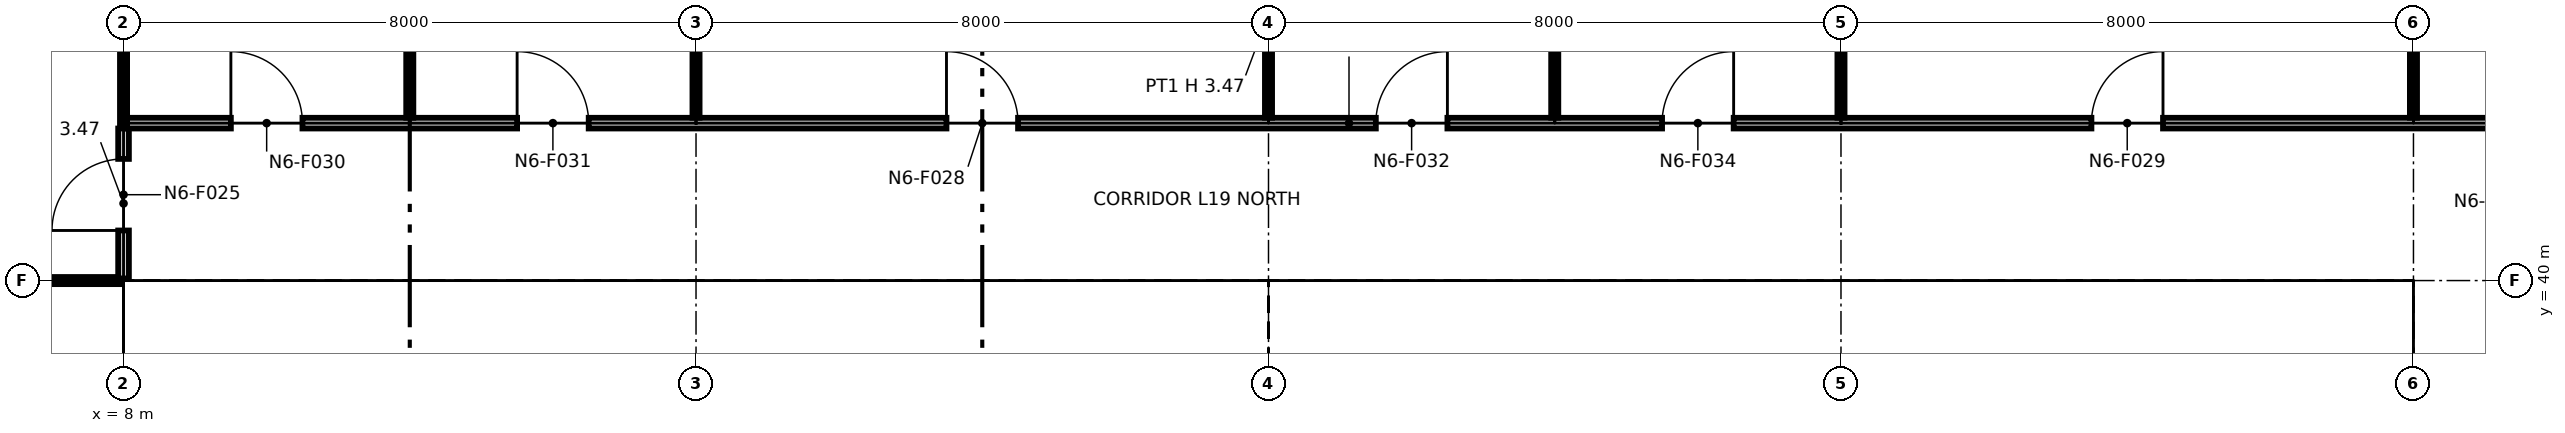
"""IFC4 building model, lengths in metres.
Left out: names, types, materials, properties, quantities, classifications, styles, units other than length and angle.
Written with IfcOpenShell. Run it as: python <this file> out.ifc"""

import sys

from ifc_helpers import new_model, si_unit, direction, frame, frame_2d, origin, origin_2d, place, context, subcontext, project, spatial, polyline, rectangle, i_section, outline, extrude, element, fill, save


model = new_model("IFC4")
c1 = context("Model", 3, precision=1e-05, world=origin(), true_north=direction((0.0, 1.0)))
c2 = subcontext(c1, "Body", "Model", "MODEL_VIEW")
j1 = project(units=[si_unit("LENGTHUNIT", "METRE"), si_unit("PLANEANGLEUNIT", "RADIAN")], contexts=[c1])
p1 = place(None, origin())
s1 = spatial("IfcSite", under=j1, at=p1, CompositionType="ELEMENT")
p2 = place(p1, origin())
s2 = spatial("IfcBuilding", under=s1, at=p2, CompositionType="ELEMENT")
p3 = place(p2, frame((0.0, 0.0, 100.8)))
s3 = spatial("IfcBuildingStorey", under=s2, at=p3, CompositionType="ELEMENT", Elevation=100.8)
for number, where, z_axis, x_axis in (
    (1, (8.0, 40.0, 0.0), (0.0, 0.0, 1.0), (1.0, 0.0, 0.0)),
    (2, (16.0, 40.0, 0.0), (0.0, 0.0, 1.0), (1.0, 0.0, 0.0)),
):
    element("IfcColumn", number, at=place(p3, frame(where, z_axis=z_axis, x_axis=x_axis)), inside=s3, PredefinedType="COLUMN", context=c2, shape_type="SweptSolid", body=[
        extrude(i_section(OverallWidth=0.373, OverallDepth=0.368, WebThickness=0.015, FlangeThickness=0.024, at=origin_2d()), origin(), (0.0, 0.0, 1.0), 4.25),
    ])
p4 = place(p3, frame((24.0, 40.0, 0.0), z_axis=(0.0, 0.0, 1.0), x_axis=(1.0, 0.0, 0.0)))
e3 = element("IfcColumn", 3, at=p4, inside=s3, PredefinedType="COLUMN", context=c2, shape_type="SweptSolid", body=[
    extrude(i_section(OverallWidth=0.394, OverallDepth=0.376, WebThickness=0.017, FlangeThickness=0.028, at=origin_2d()), origin(), (0.0, 0.0, 1.0), 4.25),
])
for number, where, z_axis, x_axis in (
    (4, (32.0, 40.0, 0.0), (0.0, 0.0, 1.0), (1.0, 0.0, 0.0)),
    (5, (40.0, 40.0, 0.0), (0.0, 0.0, 1.0), (1.0, 0.0, 0.0)),
):
    element("IfcColumn", number, at=place(p3, frame(where, z_axis=z_axis, x_axis=x_axis)), inside=s3, PredefinedType="COLUMN", context=c2, shape_type="SweptSolid", body=[
        extrude(i_section(OverallWidth=0.257, OverallDepth=0.363, WebThickness=0.013, FlangeThickness=0.022, at=origin_2d()), origin(), (0.0, 0.0, 1.0), 4.25),
    ])
p5 = place(p3, frame((8.75, 32.85, 0.0), z_axis=(0.0, 0.0, 1.0), x_axis=(0.0, 1.0, 0.0)))
e6 = element("IfcWall", 6, at=p5, inside=s3, PredefinedType="PARTITIONING", context=c2, shape_type="SweptSolid", body=[
    extrude(outline(polyline([(0.0, 0.0), (6.3, 0.0), (6.3, 4.25), (3.231, 4.25), (3.23, 3.789), (3.07, 3.789), (3.069, 4.25), (0.0, 4.25), (0.0, 0.0)])), frame((0.0, 0.1, 0.0), z_axis=(0.0, -1.0, 0.0), x_axis=(1.0, 0.0, 0.0)), (0.0, 0.0, 1.0), 0.2),
])
p6 = place(p3, frame((8.65, 39.25, 0.0), z_axis=(0.0, 0.0, 1.0), x_axis=(1.0, 0.0, 0.0)))
e7 = element("IfcWall", 7, at=p6, inside=s3, PredefinedType="PARTITIONING", context=c2, shape_type="SweptSolid", body=[
    extrude(outline(polyline([(0.0, 0.0), (14.7, 0.0), (14.7, 4.25), (7.469, 4.25), (7.469, 3.632), (7.231, 3.632), (7.23, 4.25), (0.0, 4.25), (0.0, 0.0)])), frame((0.0, 0.1, 0.0), z_axis=(0.0, -1.0, 0.0), x_axis=(1.0, 0.0, 0.0)), (0.0, 0.0, 1.0), 0.2),
])
for number, where, z_axis, x_axis in (
    (8, (10.675, 34.95, 0.0), (0.0, 0.0, 1.0), (0.0, 1.0, 0.0)),
    (9, (12.425, 34.95, 0.0), (0.0, 0.0, 1.0), (0.0, 1.0, 0.0)),
    (10, (14.275, 34.95, 0.0), (0.0, 0.0, 1.0), (0.0, 1.0, 0.0)),
):
    element("IfcWall", number, at=place(p3, frame(where, z_axis=z_axis, x_axis=x_axis)), inside=s3, PredefinedType="PARTITIONING", context=c2, shape_type="SweptSolid", body=[
        extrude(outline(polyline([(0.0, 0.0), (4.2, 0.0), (4.2, 4.25), (1.132, 4.25), (1.131, 3.789), (0.969, 3.789), (0.969, 4.25), (0.0, 4.25), (0.0, 0.0)])), frame((0.0, 0.075, 0.0), z_axis=(0.0, -1.0, 0.0), x_axis=(1.0, 0.0, 0.0)), (0.0, 0.0, 1.0), 0.15),
    ])
p7 = place(p3, frame((16.0, 34.95, 0.0), z_axis=(0.0, 0.0, 1.0), x_axis=(0.0, 1.0, 0.0)))
e11 = element("IfcWall", 11, at=p7, inside=s3, PredefinedType="PARTITIONING", context=c2, shape_type="SweptSolid", body=[
    extrude(rectangle(XDim=4.2, YDim=0.6, at=frame_2d((2.1, 0.0))), origin(), (0.0, 0.0, 1.0), 3.632),
])
for number, where, z_axis, x_axis in (
    (12, (19.2, 32.85, 0.0), (0.0, 0.0, 1.0), (0.0, 1.0, 0.0)),
    (13, (23.25, 32.85, 0.0), (0.0, 0.0, 1.0), (0.0, 1.0, 0.0)),
):
    element("IfcWall", number, at=place(p3, frame(where, z_axis=z_axis, x_axis=x_axis)), inside=s3, PredefinedType="PARTITIONING", context=c2, shape_type="SweptSolid", body=[
        extrude(rectangle(XDim=6.3, YDim=0.2, at=frame_2d((3.15, 0.0))), origin(), (0.0, 0.0, 1.0), 4.25),
    ])
p8 = place(p3, frame((24.75, 32.85, 0.0), z_axis=(0.0, 0.0, 1.0), x_axis=(0.0, 1.0, 0.0)))
e14 = element("IfcWall", 14, at=p8, inside=s3, PredefinedType="PARTITIONING", context=c2, shape_type="SweptSolid", body=[
    extrude(outline(polyline([(0.0, 0.0), (6.3, 0.0), (6.3, 4.25), (3.231, 4.25), (3.23, 3.789), (3.07, 3.789), (3.069, 4.25), (0.0, 4.25), (0.0, 0.0)])), frame((0.0, 0.1, 0.0), z_axis=(0.0, -1.0, 0.0), x_axis=(1.0, 0.0, 0.0)), (0.0, 0.0, 1.0), 0.2),
])
p9 = place(p3, frame((24.65, 39.25, 0.0), z_axis=(0.0, 0.0, 1.0), x_axis=(1.0, 0.0, 0.0)))
e15 = element("IfcWall", 15, at=p9, inside=s3, PredefinedType="PARTITIONING", context=c2, shape_type="SweptSolid", body=[
    extrude(outline(polyline([(0.0, 0.0), (14.7, 0.0), (14.7, 4.25), (7.469, 4.25), (7.469, 3.632), (7.231, 3.632), (7.23, 4.25), (0.0, 4.25), (0.0, 0.0)])), frame((0.0, 0.1, 0.0), z_axis=(0.0, -1.0, 0.0), x_axis=(1.0, 0.0, 0.0)), (0.0, 0.0, 1.0), 0.2),
])
for number, where, z_axis, x_axis in (
    (16, (27.2, 36.4, 0.0), (0.0, 0.0, 1.0), (0.0, 1.0, 0.0)),
    (17, (29.5, 36.4, 0.0), (0.0, 0.0, 1.0), (0.0, 1.0, 0.0)),
):
    element("IfcWall", number, at=place(p3, frame(where, z_axis=z_axis, x_axis=x_axis)), inside=s3, PredefinedType="PARTITIONING", context=c2, shape_type="SweptSolid", body=[
        extrude(rectangle(XDim=2.75, YDim=0.2, at=frame_2d((1.375, 0.0))), origin(), (0.0, 0.0, 1.0), 4.25),
    ])
p10 = place(p3, frame((32.0, 32.85, 0.0), z_axis=(0.0, 0.0, 1.0), x_axis=(0.0, 1.0, 0.0)))
e18 = element("IfcWall", 18, at=p10, inside=s3, PredefinedType="PARTITIONING", context=c2, shape_type="SweptSolid", body=[
    extrude(rectangle(XDim=6.3, YDim=0.6, at=frame_2d((3.15, 0.0))), origin(), (0.0, 0.0, 1.0), 3.632),
])
for number, where, z_axis, x_axis in (
    (19, (35.6, 32.85, 0.0), (0.0, 0.0, 1.0), (0.0, 1.0, 0.0)),
    (20, (39.25, 32.85, 0.0), (0.0, 0.0, 1.0), (0.0, 1.0, 0.0)),
):
    element("IfcWall", number, at=place(p3, frame(where, z_axis=z_axis, x_axis=x_axis)), inside=s3, PredefinedType="PARTITIONING", context=c2, shape_type="SweptSolid", body=[
        extrude(rectangle(XDim=6.3, YDim=0.2, at=frame_2d((3.15, 0.0))), origin(), (0.0, 0.0, 1.0), 4.25),
    ])
p11 = place(p3, frame((4.05, 40.0, 0.0), z_axis=(0.0, 0.0, 1.0), x_axis=(1.0, 0.0, 0.0)))
e21 = element("IfcWall", 21, at=p11, inside=s3, PredefinedType="PARTITIONING", context=c2, shape_type="SweptSolid", body=[
    extrude(rectangle(XDim=3.92, YDim=0.1, at=frame_2d((1.96, 0.0))), origin(), (0.0, 0.0, 1.0), 3.47),
])
p12 = place(p3, frame((8.0, 40.03, 0.0), z_axis=(0.0, 0.0, 1.0), x_axis=(0.0, 1.0, 0.0)))
e22 = element("IfcWall", 22, at=p12, inside=s3, PredefinedType="PARTITIONING", context=c2, shape_type="SweptSolid", body=[
    extrude(rectangle(XDim=2.095, YDim=0.15, at=frame_2d((1.047, 0.0))), origin(), (0.0, 0.0, 1.0), 3.47),
])
p13 = place(p12, frame((0.67, 0.0, 0.0)))
e23 = element("IfcOpeningElement", 23, at=p13, cuts=e22, PredefinedType="OPENING", context=c2, shape_type="SweptSolid", body=[
    extrude(rectangle(XDim=1.0, YDim=2.1, at=frame_2d((0.5, 1.05))), frame((0.0, 0.085, 0.0), z_axis=(0.0, -1.0, 0.0), x_axis=(1.0, 0.0, 0.0)), (0.0, 0.0, 1.0), 0.17),
])
p14 = place(p3, frame((8.05, 42.2, 0.0), z_axis=(0.0, 0.0, 1.0), x_axis=(1.0, 0.0, 0.0)))
e24 = element("IfcWall", 24, at=p14, inside=s3, PredefinedType="PARTITIONING", context=c2, shape_type="SweptSolid", body=[
    extrude(rectangle(XDim=34.15, YDim=0.15, at=frame_2d((17.075, 0.0))), origin(), (0.0, 0.0, 1.0), 4.25),
])
p15 = place(p14, frame((11.45, 0.0, 0.0)))
e25 = element("IfcOpeningElement", 25, at=p15, cuts=e24, PredefinedType="OPENING", context=c2, shape_type="SweptSolid", body=[
    extrude(rectangle(XDim=1.0, YDim=2.1, at=frame_2d((0.5, 1.05))), frame((0.0, 0.085, 0.0), z_axis=(0.0, -1.0, 0.0), x_axis=(1.0, 0.0, 0.0)), (0.0, 0.0, 1.0), 0.17),
])
p16 = place(p14, frame((27.45, 0.0, 0.0)))
e26 = element("IfcOpeningElement", 26, at=p16, cuts=e24, PredefinedType="OPENING", context=c2, shape_type="SweptSolid", body=[
    extrude(rectangle(XDim=1.0, YDim=2.1, at=frame_2d((0.5, 1.05))), frame((0.0, 0.085, 0.0), z_axis=(0.0, -1.0, 0.0), x_axis=(1.0, 0.0, 0.0)), (0.0, 0.0, 1.0), 0.17),
])
p17 = place(p14, frame((1.45, 0.0, 0.0)))
e27 = element("IfcOpeningElement", 27, at=p17, cuts=e24, PredefinedType="OPENING", context=c2, shape_type="SweptSolid", body=[
    extrude(rectangle(XDim=1.0, YDim=2.1, at=frame_2d((0.5, 1.05))), frame((0.0, 0.085, 0.0), z_axis=(0.0, -1.0, 0.0), x_axis=(1.0, 0.0, 0.0)), (0.0, 0.0, 1.0), 0.17),
])
p18 = place(p14, frame((5.45, 0.0, 0.0)))
e28 = element("IfcOpeningElement", 28, at=p18, cuts=e24, PredefinedType="OPENING", context=c2, shape_type="SweptSolid", body=[
    extrude(rectangle(XDim=1.0, YDim=2.1, at=frame_2d((0.5, 1.05))), frame((0.0, 0.085, 0.0), z_axis=(0.0, -1.0, 0.0), x_axis=(1.0, 0.0, 0.0)), (0.0, 0.0, 1.0), 0.17),
])
p19 = place(p14, frame((17.45, 0.0, 0.0)))
e29 = element("IfcOpeningElement", 29, at=p19, cuts=e24, PredefinedType="OPENING", context=c2, shape_type="SweptSolid", body=[
    extrude(rectangle(XDim=1.0, YDim=2.1, at=frame_2d((0.5, 1.05))), frame((0.0, 0.085, 0.0), z_axis=(0.0, -1.0, 0.0), x_axis=(1.0, 0.0, 0.0)), (0.0, 0.0, 1.0), 0.17),
])
p20 = place(p14, frame((21.45, 0.0, 0.0)))
e30 = element("IfcOpeningElement", 30, at=p20, cuts=e24, PredefinedType="OPENING", context=c2, shape_type="SweptSolid", body=[
    extrude(rectangle(XDim=1.0, YDim=2.1, at=frame_2d((0.5, 1.05))), frame((0.0, 0.085, 0.0), z_axis=(0.0, -1.0, 0.0), x_axis=(1.0, 0.0, 0.0)), (0.0, 0.0, 1.0), 0.17),
])
p21 = place(p3, frame((8.0, 42.2, 0.0), z_axis=(0.0, 0.0, 1.0), x_axis=(0.0, 1.0, 0.0)))
e31 = element("IfcWall", 31, at=p21, inside=s3, PredefinedType="PARTITIONING", context=c2, shape_type="SweptSolid", body=[
    extrude(rectangle(XDim=5.67, YDim=0.1, at=frame_2d((2.835, 0.0))), origin(), (0.0, 0.0, 1.0), 3.47),
])
p22 = place(p3, frame((12.0, 42.275, 0.0), z_axis=(0.0, 0.0, 1.0), x_axis=(0.0, 1.0, 0.0)))
e32 = element("IfcWall", 32, at=p22, inside=s3, PredefinedType="PARTITIONING", context=c2, shape_type="SweptSolid", body=[
    extrude(outline(polyline([(0.0, 0.0), (5.595, 0.0), (5.595, 4.25), (2.025, 4.25), (2.023, 3.47), (1.427, 3.47), (1.425, 4.25), (0.0, 4.25), (0.0, 0.0)])), frame((0.0, 0.05, 0.0), z_axis=(0.0, -1.0, 0.0), x_axis=(1.0, 0.0, 0.0)), (0.0, 0.0, 1.0), 0.1),
])
for number, where, z_axis, x_axis in (
    (33, (16.0, 42.275, 0.0), (0.0, 0.0, 1.0), (0.0, 1.0, 0.0)),
    (34, (24.0, 42.275, 0.0), (0.0, 0.0, 1.0), (0.0, 1.0, 0.0)),
):
    element("IfcWall", number, at=place(p3, frame(where, z_axis=z_axis, x_axis=x_axis)), inside=s3, PredefinedType="PARTITIONING", context=c2, shape_type="SweptSolid", body=[
        extrude(rectangle(XDim=2.895, YDim=0.1, at=frame_2d((1.448, 0.0))), origin(), (0.0, 0.0, 1.0), 3.47),
    ])
p23 = place(p3, frame((28.0, 42.275, 0.0), z_axis=(0.0, 0.0, 1.0), x_axis=(0.0, 1.0, 0.0)))
e35 = element("IfcWall", 35, at=p23, inside=s3, PredefinedType="PARTITIONING", context=c2, shape_type="SweptSolid", body=[
    extrude(rectangle(XDim=3.375, YDim=0.1, at=frame_2d((1.688, 0.0))), origin(), (0.0, 0.0, 1.0), 3.47),
])
for number, where, z_axis, x_axis in (
    (36, (32.0, 42.275, 0.0), (0.0, 0.0, 1.0), (0.0, 1.0, 0.0)),
    (37, (40.0, 42.275, 0.0), (0.0, 0.0, 1.0), (0.0, 1.0, 0.0)),
):
    element("IfcWall", number, at=place(p3, frame(where, z_axis=z_axis, x_axis=x_axis)), inside=s3, PredefinedType="PARTITIONING", context=c2, shape_type="SweptSolid", body=[
        extrude(rectangle(XDim=2.895, YDim=0.1, at=frame_2d((1.448, 0.0))), origin(), (0.0, 0.0, 1.0), 3.47),
    ])
p24 = place(p13, origin())
e38 = element("IfcDoor", 38, at=p24, inside=s3, OperationType="SINGLE_SWING_LEFT", PredefinedType="DOOR", context=c2, shape_type="SweptSolid", body=[
    extrude(rectangle(XDim=1.0, YDim=2.1, at=frame_2d((0.5, 1.05))), frame((0.0, 0.025, 0.0), z_axis=(0.0, -1.0, 0.0), x_axis=(1.0, 0.0, 0.0)), (0.0, 0.0, 1.0), 0.05),
])
fill(e23, e38)
p25 = place(p15, origin())
e39 = element("IfcDoor", 39, at=p25, inside=s3, OperationType="SINGLE_SWING_LEFT", PredefinedType="DOOR", context=c2, shape_type="SweptSolid", body=[
    extrude(rectangle(XDim=1.0, YDim=2.1, at=frame_2d((0.5, 1.05))), frame((0.0, 0.025, 0.0), z_axis=(0.0, -1.0, 0.0), x_axis=(1.0, 0.0, 0.0)), (0.0, 0.0, 1.0), 0.05),
])
fill(e25, e39)
p26 = place(p16, origin())
e40 = element("IfcDoor", 40, at=p26, inside=s3, OperationType="SINGLE_SWING_RIGHT", PredefinedType="DOOR", context=c2, shape_type="SweptSolid", body=[
    extrude(rectangle(XDim=1.0, YDim=2.1, at=frame_2d((0.5, 1.05))), frame((0.0, 0.025, 0.0), z_axis=(0.0, -1.0, 0.0), x_axis=(1.0, 0.0, 0.0)), (0.0, 0.0, 1.0), 0.05),
])
fill(e26, e40)
p27 = place(p17, origin())
e41 = element("IfcDoor", 41, at=p27, inside=s3, OperationType="SINGLE_SWING_LEFT", PredefinedType="DOOR", context=c2, shape_type="SweptSolid", body=[
    extrude(rectangle(XDim=1.0, YDim=2.1, at=frame_2d((0.5, 1.05))), frame((0.0, 0.025, 0.0), z_axis=(0.0, -1.0, 0.0), x_axis=(1.0, 0.0, 0.0)), (0.0, 0.0, 1.0), 0.05),
])
fill(e27, e41)
p28 = place(p18, origin())
e42 = element("IfcDoor", 42, at=p28, inside=s3, OperationType="SINGLE_SWING_LEFT", PredefinedType="DOOR", context=c2, shape_type="SweptSolid", body=[
    extrude(rectangle(XDim=1.0, YDim=2.1, at=frame_2d((0.5, 1.05))), frame((0.0, 0.025, 0.0), z_axis=(0.0, -1.0, 0.0), x_axis=(1.0, 0.0, 0.0)), (0.0, 0.0, 1.0), 0.05),
])
fill(e28, e42)
p29 = place(p19, origin())
e43 = element("IfcDoor", 43, at=p29, inside=s3, OperationType="SINGLE_SWING_RIGHT", PredefinedType="DOOR", context=c2, shape_type="SweptSolid", body=[
    extrude(rectangle(XDim=1.0, YDim=2.1, at=frame_2d((0.5, 1.05))), frame((0.0, 0.025, 0.0), z_axis=(0.0, -1.0, 0.0), x_axis=(1.0, 0.0, 0.0)), (0.0, 0.0, 1.0), 0.05),
])
fill(e29, e43)
p30 = place(p20, origin())
e44 = element("IfcDoor", 44, at=p30, inside=s3, OperationType="SINGLE_SWING_RIGHT", PredefinedType="DOOR", context=c2, shape_type="SweptSolid", body=[
    extrude(rectangle(XDim=1.0, YDim=2.1, at=frame_2d((0.5, 1.05))), frame((0.0, 0.025, 0.0), z_axis=(0.0, -1.0, 0.0), x_axis=(1.0, 0.0, 0.0)), (0.0, 0.0, 1.0), 0.05),
])
fill(e30, e44)
save(model, sys.argv[1])
